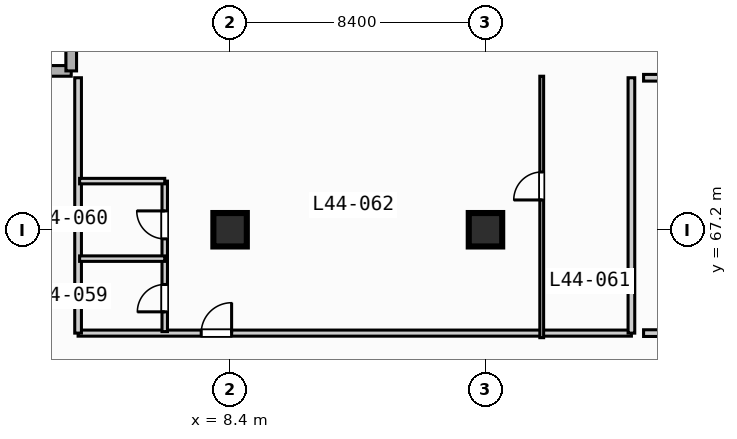
"""IFC4 building model, lengths in metres.
Left out: names, types, materials, properties, quantities, classifications, styles, units other than length and angle.
Written with IfcOpenShell. Run it as: python <this file> out.ifc"""

import sys

from ifc_helpers import new_model, si_unit, direction, frame, frame_2d, origin, origin_2d, place, context, subcontext, project, spatial, rectangle, extrude, element, fill, save


model = new_model("IFC4")
c1 = context("Model", 3, precision=1e-05, world=origin(), true_north=direction((0.0, 1.0)))
c2 = subcontext(c1, "Body", "Model", "MODEL_VIEW")
j1 = project(units=[si_unit("LENGTHUNIT", "METRE"), si_unit("PLANEANGLEUNIT", "RADIAN")], contexts=[c1])
p1 = place(None, origin())
s1 = spatial("IfcSite", under=j1, at=p1, CompositionType="ELEMENT")
p2 = place(p1, origin())
s2 = spatial("IfcBuilding", under=s1, at=p2, CompositionType="ELEMENT")
p3 = place(p2, frame((0.0, 0.0, 182.8)))
s3 = spatial("IfcBuildingStorey", under=s2, at=p3, CompositionType="ELEMENT", Elevation=182.8)
for number, where, z_axis, x_axis in (
    (1, (8.4, 67.2, 0.0), (0.0, 0.0, 1.0), (1.0, 0.0, 0.0)),
    (2, (16.8, 67.2, 0.0), (0.0, 0.0, 1.0), (1.0, 0.0, 0.0)),
):
    element("IfcColumn", number, at=place(p3, frame(where, z_axis=z_axis, x_axis=x_axis)), inside=s3, PredefinedType="COLUMN", context=c2, shape_type="SweptSolid", body=[
        extrude(rectangle(XDim=1.1, YDim=1.1, at=origin_2d()), origin(), (0.0, 0.0, 1.0), 3.7),
    ])
for number, where, z_axis, x_axis in (
    (3, (0.175, 72.425, 0.0), (0.0, 0.0, 1.0), (1.0, 0.0, 0.0)),
    (4, (3.175, 72.425, 0.0), (0.0, 0.0, 1.0), (0.0, 1.0, 0.0)),
):
    element("IfcWall", number, at=place(p3, frame(where, z_axis=z_axis, x_axis=x_axis)), inside=s3, PredefinedType="STANDARD", context=c2, shape_type="SweptSolid", body=[
        extrude(rectangle(XDim=3.0, YDim=0.35, at=frame_2d((1.5, 0.0))), origin(), (0.0, 0.0, 1.0), 3.47),
    ])
p4 = place(p3, frame((3.4, 63.8, 0.0), z_axis=(0.0, 0.0, 1.0), x_axis=(1.0, 0.0, 0.0)))
e5 = element("IfcWall", 5, at=p4, inside=s3, PredefinedType="PARTITIONING", context=c2, shape_type="SweptSolid", body=[
    extrude(rectangle(XDim=18.2, YDim=0.2, at=frame_2d((9.1, 0.0))), origin(), (0.0, 0.0, 1.0), 3.47),
])
p5 = place(p4, frame((4.05, 0.0, 0.0)))
e6 = element("IfcOpeningElement", 6, at=p5, cuts=e5, PredefinedType="OPENING", context=c2, shape_type="SweptSolid", body=[
    extrude(rectangle(XDim=1.0, YDim=2.15, at=frame_2d((0.5, 1.075))), frame((0.0, 0.11, 0.0), z_axis=(0.0, -1.0, 0.0), x_axis=(1.0, 0.0, 0.0)), (0.0, 0.0, 1.0), 0.22),
])
for number, where, z_axis, x_axis in (
    (7, (21.6, 63.8, 0.0), (0.0, 0.0, 1.0), (0.0, 1.0, 0.0)),
    (8, (3.4, 63.8, 0.0), (0.0, 0.0, 1.0), (0.0, 1.0, 0.0)),
):
    element("IfcWall", number, at=place(p3, frame(where, z_axis=z_axis, x_axis=x_axis)), inside=s3, PredefinedType="PARTITIONING", context=c2, shape_type="SweptSolid", body=[
        extrude(rectangle(XDim=8.4, YDim=0.22, at=frame_2d((4.2, 0.0))), origin(), (0.0, 0.0, 1.0), 3.47),
    ])
p6 = place(p3, frame((6.25, 63.85, 0.0), z_axis=(0.0, 0.0, 1.0), x_axis=(0.0, 1.0, 0.0)))
e9 = element("IfcWall", 9, at=p6, inside=s3, PredefinedType="PLUMBINGWALL", context=c2, shape_type="SweptSolid", body=[
    extrude(rectangle(XDim=4.95, YDim=0.18, at=frame_2d((2.475, 0.0))), origin(), (0.0, 0.0, 1.0), 3.47),
])
p7 = place(p6, frame((0.65, 0.0, 0.0)))
e10 = element("IfcOpeningElement", 10, at=p7, cuts=e9, PredefinedType="OPENING", context=c2, shape_type="SweptSolid", body=[
    extrude(rectangle(XDim=0.9, YDim=2.1, at=frame_2d((0.45, 1.05))), frame((0.0, 0.1, 0.0), z_axis=(0.0, -1.0, 0.0), x_axis=(1.0, 0.0, 0.0)), (0.0, 0.0, 1.0), 0.2),
])
p8 = place(p6, frame((3.05, 0.0, 0.0)))
e11 = element("IfcOpeningElement", 11, at=p8, cuts=e9, PredefinedType="OPENING", context=c2, shape_type="SweptSolid", body=[
    extrude(rectangle(XDim=0.92, YDim=2.1, at=frame_2d((0.46, 1.05))), frame((0.0, 0.1, 0.0), z_axis=(0.0, -1.0, 0.0), x_axis=(1.0, 0.0, 0.0)), (0.0, 0.0, 1.0), 0.2),
])
for number, where, z_axis, x_axis in (
    (12, (3.45, 66.25, 0.0), (0.0, 0.0, 1.0), (1.0, 0.0, 0.0)),
    (13, (3.45, 68.8, 0.0), (0.0, 0.0, 1.0), (1.0, 0.0, 0.0)),
):
    element("IfcWall", number, at=place(p3, frame(where, z_axis=z_axis, x_axis=x_axis)), inside=s3, PredefinedType="PLUMBINGWALL", context=c2, shape_type="SweptSolid", body=[
        extrude(rectangle(XDim=2.8, YDim=0.18, at=frame_2d((1.4, 0.0))), origin(), (0.0, 0.0, 1.0), 3.47),
    ])
p9 = place(p3, frame((18.65, 63.65, 0.0), z_axis=(0.0, 0.0, 1.0), x_axis=(0.0, 1.0, 0.0)))
e14 = element("IfcWall", 14, at=p9, inside=s3, PredefinedType="PARTITIONING", context=c2, shape_type="SweptSolid", body=[
    extrude(rectangle(XDim=8.6, YDim=0.125, at=frame_2d((4.3, 0.0))), origin(), (0.0, 0.0, 1.0), 3.47),
])
p10 = place(p9, frame((4.53, 0.0, 0.0)))
e15 = element("IfcOpeningElement", 15, at=p10, cuts=e14, PredefinedType="OPENING", context=c2, shape_type="SweptSolid", body=[
    extrude(rectangle(XDim=0.92, YDim=2.1, at=frame_2d((0.46, 1.05))), frame((0.0, 0.073, 0.0), z_axis=(0.0, -1.0, 0.0), x_axis=(1.0, 0.0, 0.0)), (0.0, 0.0, 1.0), 0.145),
])
p11 = place(p3, frame((22.0, 72.2, 0.0), z_axis=(0.0, 0.0, 1.0), x_axis=(1.0, 0.0, 0.0)))
e16 = element("IfcWall", 16, at=p11, inside=s3, PredefinedType="PARTITIONING", context=c2, shape_type="SweptSolid", body=[
    extrude(rectangle(XDim=11.3, YDim=0.22, at=frame_2d((5.65, 0.0))), origin(), (0.0, 0.0, 1.0), 3.47),
])
p12 = place(p3, frame((22.0, 63.8, 0.0), z_axis=(0.0, 0.0, 1.0), x_axis=(1.0, 0.0, 0.0)))
e17 = element("IfcWall", 17, at=p12, inside=s3, PredefinedType="PARTITIONING", context=c2, shape_type="SweptSolid", body=[
    extrude(rectangle(XDim=6.0, YDim=0.22, at=frame_2d((3.0, 0.0))), origin(), (0.0, 0.0, 1.0), 3.47),
])
p13 = place(p5, origin())
e18 = element("IfcDoor", 18, at=p13, inside=s3, OperationType="SINGLE_SWING_RIGHT", PredefinedType="DOOR", context=c2, shape_type="SweptSolid", body=[
    extrude(rectangle(XDim=1.0, YDim=2.15, at=frame_2d((0.5, 1.075))), frame((0.0, 0.025, 0.0), z_axis=(0.0, -1.0, 0.0), x_axis=(1.0, 0.0, 0.0)), (0.0, 0.0, 1.0), 0.05),
])
fill(e6, e18)
p14 = place(p7, origin())
e19 = element("IfcDoor", 19, at=p14, inside=s3, OperationType="SINGLE_SWING_LEFT", PredefinedType="DOOR", context=c2, shape_type="SweptSolid", body=[
    extrude(rectangle(XDim=0.9, YDim=2.1, at=frame_2d((0.45, 1.05))), frame((0.0, 0.025, 0.0), z_axis=(0.0, -1.0, 0.0), x_axis=(1.0, 0.0, 0.0)), (0.0, 0.0, 1.0), 0.05),
])
fill(e10, e19)
p15 = place(p8, origin())
e20 = element("IfcDoor", 20, at=p15, inside=s3, OperationType="SINGLE_SWING_RIGHT", PredefinedType="DOOR", context=c2, shape_type="SweptSolid", body=[
    extrude(rectangle(XDim=0.92, YDim=2.1, at=frame_2d((0.46, 1.05))), frame((0.0, 0.025, 0.0), z_axis=(0.0, -1.0, 0.0), x_axis=(1.0, 0.0, 0.0)), (0.0, 0.0, 1.0), 0.05),
])
fill(e11, e20)
p16 = place(p10, origin())
e21 = element("IfcDoor", 21, at=p16, inside=s3, OperationType="SINGLE_SWING_LEFT", PredefinedType="DOOR", context=c2, shape_type="SweptSolid", body=[
    extrude(rectangle(XDim=0.92, YDim=2.1, at=frame_2d((0.46, 1.05))), frame((0.0, 0.025, 0.0), z_axis=(0.0, -1.0, 0.0), x_axis=(1.0, 0.0, 0.0)), (0.0, 0.0, 1.0), 0.05),
])
fill(e15, e21)
save(model, sys.argv[1])
